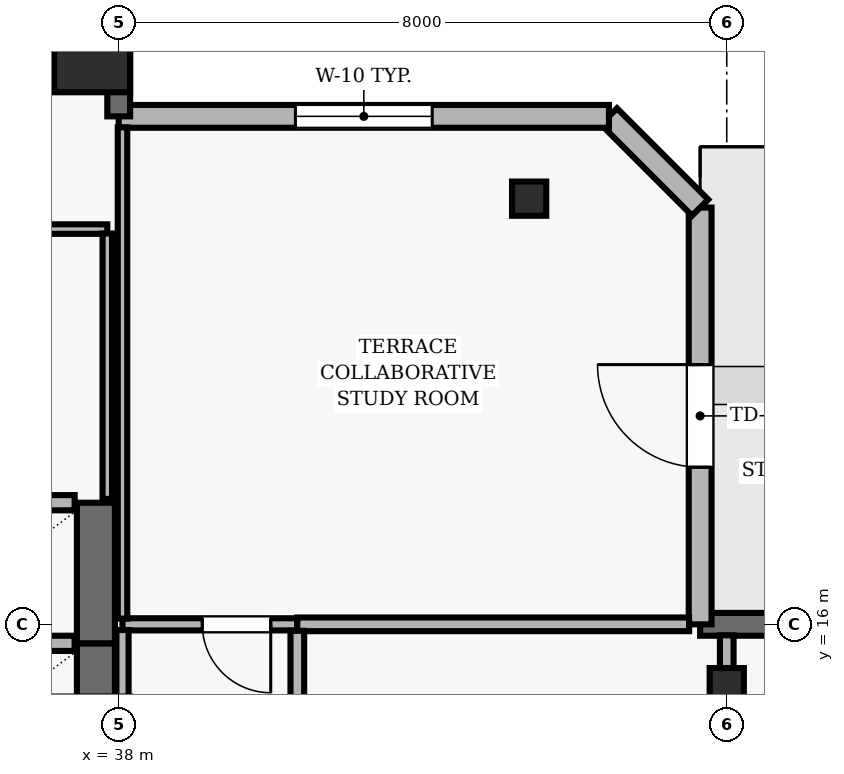
"""IFC4 building model, lengths in metres.
Left out: names, types, materials, properties, quantities, classifications, styles, units other than length and angle.
Written with IfcOpenShell. Run it as: python <this file> out.ifc"""

import sys

from ifc_helpers import new_model, si_unit, direction, frame, frame_2d, origin, origin_2d, place, context, subcontext, project, spatial, rectangle, hollow_rectangle, extrude, element, fill, save


model = new_model("IFC4")
c1 = context("Model", 3, precision=1e-05, world=origin(), true_north=direction((0.0, 1.0)))
c2 = subcontext(c1, "Body", "Model", "MODEL_VIEW")
j1 = project(units=[si_unit("LENGTHUNIT", "METRE"), si_unit("PLANEANGLEUNIT", "RADIAN")], contexts=[c1])
p1 = place(None, origin())
s1 = spatial("IfcSite", under=j1, at=p1, CompositionType="ELEMENT")
p2 = place(p1, origin())
s2 = spatial("IfcBuilding", under=s1, at=p2, CompositionType="ELEMENT")
p3 = place(p2, frame((0.0, 0.0, 207.0)))
s3 = spatial("IfcBuildingStorey", under=s2, at=p3, CompositionType="ELEMENT", Elevation=207.0)
p4 = place(p3, frame((37.65, 23.5, 0.0), z_axis=(0.0, 0.0, 1.0), x_axis=(1.0, 0.0, 0.0)))
e1 = element("IfcColumn", 1, at=p4, inside=s3, PredefinedType="COLUMN", context=c2, shape_type="SweptSolid", body=[
    extrude(rectangle(XDim=1.0, YDim=1.0, at=origin_2d()), origin(), (0.0, 0.0, 1.0), 3.9),
])
for number, where, z_axis, x_axis in (
    (2, (46.0, 15.2, 0.0), (0.0, 0.0, 1.0), (1.0, 0.0, 0.0)),
    (3, (43.4, 21.6, 0.0), (0.0, 0.0, 1.0), (1.0, 0.0, 0.0)),
):
    element("IfcColumn", number, at=place(p3, frame(where, z_axis=z_axis, x_axis=x_axis)), inside=s3, PredefinedType="COLUMN", context=c2, shape_type="SweptSolid", body=[
        extrude(hollow_rectangle(XDim=0.45, YDim=0.45, WallThickness=0.02, at=origin_2d()), origin(), (0.0, 0.0, 1.0), 3.9),
    ])
p5 = place(p3, frame((62.7, 16.0, 0.0), z_axis=(0.0, 0.0, 1.0), x_axis=(-1.0, 0.0, 0.0)))
e4 = element("IfcWall", 4, at=p5, inside=s3, PredefinedType="SOLIDWALL", context=c2, shape_type="SweptSolid", body=[
    extrude(rectangle(XDim=17.05, YDim=0.3, at=frame_2d((8.525, 0.0))), origin(), (0.0, 0.0, 1.0), 3.69),
])
p6 = place(p5, frame((13.0, 0.0, 0.0)))
e5 = element("IfcOpeningElement", 5, at=p6, cuts=e4, PredefinedType="OPENING", context=c2, shape_type="SweptSolid", body=[
    extrude(rectangle(XDim=1.0, YDim=2.2, at=frame_2d((0.5, 1.1))), frame((0.0, 0.16, 0.0), z_axis=(0.0, -1.0, 0.0), x_axis=(1.0, 0.0, 0.0)), (0.0, 0.0, 1.0), 0.32),
])
p7 = place(p5, frame((2.842, 0.0, 0.9)))
e6 = element("IfcOpeningElement", 6, at=p7, cuts=e4, PredefinedType="OPENING", context=c2, shape_type="SweptSolid", body=[
    extrude(rectangle(XDim=1.8, YDim=1.8, at=frame_2d((0.9, 0.9))), frame((0.0, 0.16, 0.0), z_axis=(0.0, -1.0, 0.0), x_axis=(1.0, 0.0, 0.0)), (0.0, 0.0, 1.0), 0.32),
])
p8 = place(p5, frame((7.625, 0.0, 0.9)))
e7 = element("IfcOpeningElement", 7, at=p8, cuts=e4, PredefinedType="OPENING", context=c2, shape_type="SweptSolid", body=[
    extrude(rectangle(XDim=1.8, YDim=1.8, at=frame_2d((0.9, 0.9))), frame((0.0, 0.16, 0.0), z_axis=(0.0, -1.0, 0.0), x_axis=(1.0, 0.0, 0.0)), (0.0, 0.0, 1.0), 0.32),
])
p9 = place(p3, frame((45.65, 16.0, 0.0), z_axis=(0.0, 0.0, 1.0), x_axis=(0.0, 1.0, 0.0)))
e8 = element("IfcWall", 8, at=p9, inside=s3, PredefinedType="SOLIDWALL", context=c2, shape_type="SweptSolid", body=[
    extrude(rectangle(XDim=5.483, YDim=0.3, at=frame_2d((2.741, 0.0))), origin(), (0.0, 0.0, 1.0), 3.69),
])
p10 = place(p9, frame((2.067, 0.0, 0.0)))
e9 = element("IfcOpeningElement", 9, at=p10, cuts=e8, PredefinedType="OPENING", context=c2, shape_type="SweptSolid", body=[
    extrude(rectangle(XDim=1.35, YDim=2.2, at=frame_2d((0.675, 1.1))), frame((0.0, 0.16, 0.0), z_axis=(0.0, -1.0, 0.0), x_axis=(1.0, 0.0, 0.0)), (0.0, 0.0, 1.0), 0.32),
])
p11 = place(p3, frame((45.65, 21.483, 0.0), z_axis=(0.0, 0.0, 1.0), x_axis=(-0.707034851297, 0.707178703759, 0.0)))
e10 = element("IfcWall", 10, at=p11, inside=s3, PredefinedType="SOLIDWALL", context=c2, shape_type="SweptSolid", body=[
    extrude(rectangle(XDim=1.697, YDim=0.3, at=frame_2d((0.849, 0.0))), origin(), (0.0, 0.0, 1.0), 3.69),
])
p12 = place(p3, frame((44.45, 22.683, 0.0), z_axis=(0.0, 0.0, 1.0), x_axis=(-1.0, 0.0, 0.0)))
e11 = element("IfcWall", 11, at=p12, inside=s3, PredefinedType="SOLIDWALL", context=c2, shape_type="SweptSolid", body=[
    extrude(rectangle(XDim=6.45, YDim=0.3, at=frame_2d((3.225, 0.0))), origin(), (0.0, 0.0, 1.0), 3.69),
])
p13 = place(p12, frame((2.325, 0.0, 0.9)))
e12 = element("IfcOpeningElement", 12, at=p13, cuts=e11, PredefinedType="OPENING", context=c2, shape_type="SweptSolid", body=[
    extrude(rectangle(XDim=1.8, YDim=2.2, at=frame_2d((0.9, 1.1))), frame((0.0, 0.16, 0.0), z_axis=(0.0, -1.0, 0.0), x_axis=(1.0, 0.0, 0.0)), (0.0, 0.0, 1.0), 0.32),
])
p14 = place(p3, frame((38.0, 22.683, 0.0), z_axis=(0.0, 0.0, 1.0), x_axis=(0.0, 1.0, 0.0)))
e13 = element("IfcWall", 13, at=p14, inside=s3, PredefinedType="SOLIDWALL", context=c2, shape_type="SweptSolid", body=[
    extrude(rectangle(XDim=18.017, YDim=0.3, at=frame_2d((9.008, 0.0))), origin(), (0.0, 0.0, 1.0), 3.69),
])
p15 = place(p14, frame((8.934, 0.0, 0.0)))
e14 = element("IfcOpeningElement", 14, at=p15, cuts=e13, PredefinedType="OPENING", context=c2, shape_type="SweptSolid", body=[
    extrude(rectangle(XDim=1.0, YDim=2.2, at=frame_2d((0.5, 1.1))), frame((0.0, 0.16, 0.0), z_axis=(0.0, -1.0, 0.0), x_axis=(1.0, 0.0, 0.0)), (0.0, 0.0, 1.0), 0.32),
])
p16 = place(p14, frame((13.814, 0.0, 0.9)))
e15 = element("IfcOpeningElement", 15, at=p16, cuts=e13, PredefinedType="OPENING", context=c2, shape_type="SweptSolid", body=[
    extrude(rectangle(XDim=2.4, YDim=2.2, at=frame_2d((1.2, 1.1))), frame((0.0, 0.16, 0.0), z_axis=(0.0, -1.0, 0.0), x_axis=(1.0, 0.0, 0.0)), (0.0, 0.0, 1.0), 0.32),
])
p17 = place(p3, frame((37.7, 13.9, 0.0), z_axis=(0.0, 0.0, 1.0), x_axis=(0.0, 1.0, 0.0)))
e16 = element("IfcWall", 16, at=p17, inside=s3, PredefinedType="SHEAR", context=c2, shape_type="SweptSolid", body=[
    extrude(rectangle(XDim=1.85, YDim=0.5, at=frame_2d((0.925, 0.0))), origin(), (0.0, 0.0, 1.0), 3.69),
])
p18 = place(p3, frame((37.42, 15.75, 0.0), z_axis=(0.0, 0.0, 1.0), x_axis=(-1.0, 0.0, 0.0)))
e17 = element("IfcWall", 17, at=p18, inside=s3, PredefinedType="SOLIDWALL", context=c2, shape_type="SweptSolid", body=[
    extrude(rectangle(XDim=2.14, YDim=0.2, at=frame_2d((1.07, 0.0))), origin(), (0.0, 0.0, 1.0), 3.69),
])
p19 = place(p3, frame((37.7, 15.75, 0.0), z_axis=(0.0, 0.0, 1.0), x_axis=(0.0, 1.0, 0.0)))
e18 = element("IfcWall", 18, at=p19, inside=s3, PredefinedType="SHEAR", context=c2, shape_type="SweptSolid", body=[
    extrude(rectangle(XDim=1.85, YDim=0.5, at=frame_2d((0.925, 0.0))), origin(), (0.0, 0.0, 1.0), 3.69),
])
p20 = place(p3, frame((37.42, 17.6, 0.0), z_axis=(0.0, 0.0, 1.0), x_axis=(-1.0, 0.0, 0.0)))
e19 = element("IfcWall", 19, at=p20, inside=s3, PredefinedType="SOLIDWALL", context=c2, shape_type="SweptSolid", body=[
    extrude(rectangle(XDim=2.14, YDim=0.2, at=frame_2d((1.07, 0.0))), origin(), (0.0, 0.0, 1.0), 3.69),
])
p21 = place(p3, frame((35.85, 21.2, 0.0), z_axis=(0.0, 0.0, 1.0), x_axis=(1.0, 0.0, 0.0)))
e20 = element("IfcWall", 20, at=p21, inside=s3, PredefinedType="PARTITIONING", context=c2, shape_type="SweptSolid", body=[
    extrude(rectangle(XDim=2.0, YDim=0.125, at=frame_2d((1.0, 0.0))), origin(), (0.0, 0.0, 1.0), 3.139),
])
p22 = place(p3, frame((40.35, 16.0, 0.0), z_axis=(0.0, 0.0, 1.0), x_axis=(-1.0, 0.0, 0.0)))
e21 = element("IfcWall", 21, at=p22, inside=s3, PredefinedType="PARTITIONING", context=c2, shape_type="SweptSolid", body=[
    extrude(rectangle(XDim=2.3, YDim=0.16, at=frame_2d((1.15, 0.0))), origin(), (0.0, 0.0, 1.0), 3.69),
])
p23 = place(p22, frame((0.35, 0.0, 0.0)))
e22 = element("IfcOpeningElement", 22, at=p23, cuts=e21, PredefinedType="OPENING", context=c2, shape_type="SweptSolid", body=[
    extrude(rectangle(XDim=0.9, YDim=2.1, at=frame_2d((0.45, 1.05))), frame((0.0, 0.09, 0.0), z_axis=(0.0, -1.0, 0.0), x_axis=(1.0, 0.0, 0.0)), (0.0, 0.0, 1.0), 0.18),
])
p24 = place(p3, frame((40.35, 16.0, 0.0), z_axis=(0.0, 0.0, 1.0), x_axis=(1.0, 0.0, 0.0)))
e23 = element("IfcWall", 23, at=p24, inside=s3, PredefinedType="PARTITIONING", context=c2, shape_type="SweptSolid", body=[
    extrude(rectangle(XDim=5.155, YDim=0.18, at=frame_2d((2.577, 0.0))), origin(), (0.0, 0.0, 1.0), 3.69),
])
p25 = place(p3, frame((37.85, 17.65, 0.0), z_axis=(0.0, 0.0, 1.0), x_axis=(0.0, 1.0, 0.0)))
e24 = element("IfcWall", 24, at=p25, inside=s3, PredefinedType="PARTITIONING", context=c2, shape_type="SweptSolid", body=[
    extrude(rectangle(XDim=3.492, YDim=0.125, at=frame_2d((1.746, 0.0))), origin(), (0.0, 0.0, 1.0), 3.139),
])
p26 = place(p3, frame((38.05, 15.925, 0.0), z_axis=(0.0, 0.0, 1.0), x_axis=(0.0, -1.0, 0.0)))
e25 = element("IfcWall", 25, at=p26, inside=s3, PredefinedType="PARTITIONING", context=c2, shape_type="SweptSolid", body=[
    extrude(rectangle(XDim=6.375, YDim=0.16, at=frame_2d((3.188, 0.0))), origin(), (0.0, 0.0, 1.0), 3.139),
])
p27 = place(p3, frame((38.05, 22.538, 0.0), z_axis=(0.0, 0.0, 1.0), x_axis=(0.0, -1.0, 0.0)))
e26 = element("IfcWall", 26, at=p27, inside=s3, PredefinedType="PARTITIONING", context=c2, shape_type="SweptSolid", body=[
    extrude(rectangle(XDim=6.463, YDim=0.125, at=frame_2d((3.231, 0.0))), origin(), (0.0, 0.0, 1.0), 3.139),
])
p28 = place(p3, frame((40.35, 7.635, 0.0), z_axis=(0.0, 0.0, 1.0), x_axis=(0.0, 1.0, 0.0)))
e27 = element("IfcWall", 27, at=p28, inside=s3, PredefinedType="PARTITIONING", context=c2, shape_type="SweptSolid", body=[
    extrude(rectangle(XDim=8.28, YDim=0.18, at=frame_2d((4.14, 0.0))), origin(), (0.0, 0.0, 1.0), 3.343),
])
p29 = place(p28, frame((3.665, 0.0, 0.0)))
e28 = element("IfcOpeningElement", 28, at=p29, cuts=e27, PredefinedType="OPENING", context=c2, shape_type="SweptSolid", body=[
    extrude(rectangle(XDim=0.95, YDim=2.1, at=frame_2d((0.475, 1.05))), frame((0.0, 0.1, 0.0), z_axis=(0.0, -1.0, 0.0), x_axis=(1.0, 0.0, 0.0)), (0.0, 0.0, 1.0), 0.2),
])
p30 = place(p3, frame((46.0, 7.635, 0.0), z_axis=(0.0, 0.0, 1.0), x_axis=(0.0, 1.0, 0.0)))
e29 = element("IfcWall", 29, at=p30, inside=s3, PredefinedType="PARTITIONING", context=c2, shape_type="SweptSolid", body=[
    extrude(rectangle(XDim=8.22, YDim=0.18, at=frame_2d((4.11, 0.0))), origin(), (0.0, 0.0, 1.0), 3.139),
])
p31 = place(p10, origin())
e30 = element("IfcDoor", 30, at=p31, inside=s3, OperationType="SINGLE_SWING_RIGHT", PredefinedType="DOOR", context=c2, shape_type="SweptSolid", body=[
    extrude(rectangle(XDim=1.35, YDim=2.2, at=frame_2d((0.675, 1.1))), frame((0.0, 0.025, 0.0), z_axis=(0.0, -1.0, 0.0), x_axis=(1.0, 0.0, 0.0)), (0.0, 0.0, 1.0), 0.05),
])
fill(e9, e30)
p32 = place(p13, origin())
e31 = element("IfcWindow", 31, at=p32, inside=s3, PartitioningType="SINGLE_PANEL", PredefinedType="WINDOW", context=c2, shape_type="SweptSolid", body=[
    extrude(rectangle(XDim=1.8, YDim=2.2, at=frame_2d((0.9, 1.1))), frame((0.0, 0.03, 0.0), z_axis=(0.0, -1.0, 0.0), x_axis=(1.0, 0.0, 0.0)), (0.0, 0.0, 1.0), 0.06),
])
fill(e12, e31)
p33 = place(p23, origin())
e32 = element("IfcDoor", 32, at=p33, inside=s3, OperationType="SINGLE_SWING_LEFT", PredefinedType="DOOR", context=c2, shape_type="SweptSolid", body=[
    extrude(rectangle(XDim=0.9, YDim=2.1, at=frame_2d((0.45, 1.05))), frame((0.0, 0.025, 0.0), z_axis=(0.0, -1.0, 0.0), x_axis=(1.0, 0.0, 0.0)), (0.0, 0.0, 1.0), 0.05),
])
fill(e22, e32)
save(model, sys.argv[1])
